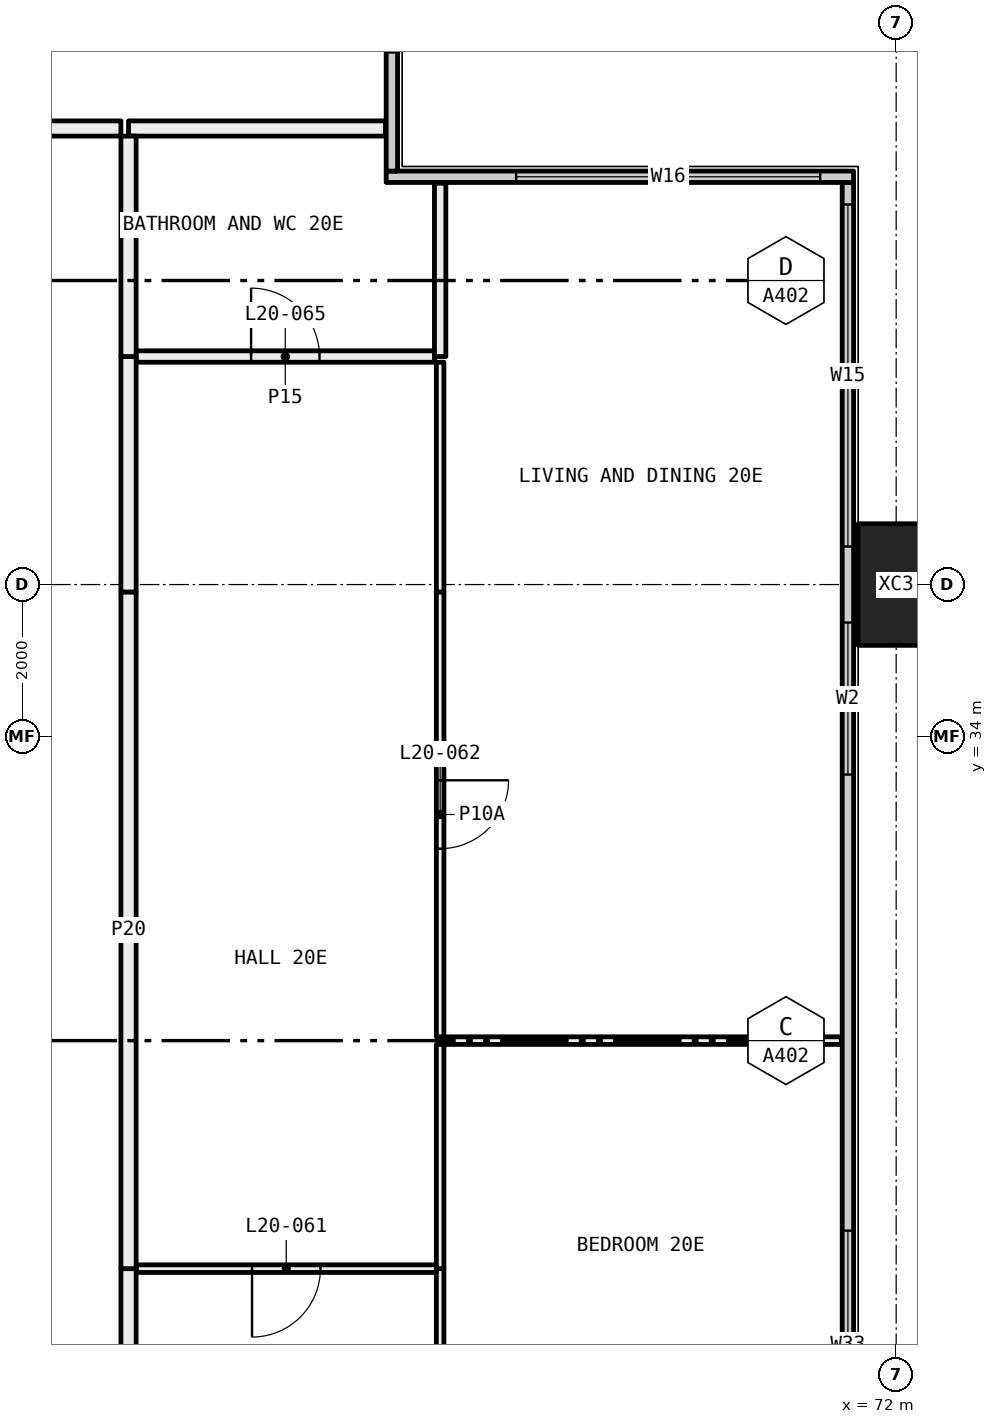
"""IFC4 building model, lengths in metres.
Left out: names, types, materials, properties, quantities, classifications, styles, units other than length and angle.
Written with IfcOpenShell. Run it as: python <this file> out.ifc"""

import sys

from ifc_helpers import new_model, si_unit, direction, frame, frame_2d, origin, origin_2d, place, context, subcontext, project, spatial, rectangle, hollow_rectangle, extrude, element, fill, save


model = new_model("IFC4")
c1 = context("Model", 3, precision=1e-05, world=origin(), true_north=direction((0.0, 1.0)))
c2 = subcontext(c1, "Body", "Model", "MODEL_VIEW")
j1 = project(units=[si_unit("LENGTHUNIT", "METRE"), si_unit("PLANEANGLEUNIT", "RADIAN")], contexts=[c1])
p1 = place(None, origin())
s1 = spatial("IfcSite", under=j1, at=p1, CompositionType="ELEMENT")
p2 = place(p1, origin())
s2 = spatial("IfcBuilding", under=s1, at=p2, CompositionType="ELEMENT")
p3 = place(p2, frame((0.0, 0.0, 81.75)))
s3 = spatial("IfcBuildingStorey", under=s2, at=p3, CompositionType="ELEMENT", Elevation=81.75)
p4 = place(p3, frame((72.0, 36.0, -0.4), z_axis=(0.0, 0.0, 1.0), x_axis=(0.0, 1.0, 0.0)))
e1 = element("IfcColumn", 1, at=p4, inside=s3, PredefinedType="COLUMN", context=c2, shape_type="SweptSolid", body=[
    extrude(hollow_rectangle(XDim=1.6, YDim=1.0, WallThickness=0.065, at=origin_2d()), origin(), (0.0, 0.0, 1.0), 3.45),
])
p5 = place(p3, frame((71.365, 6.71, 0.0), z_axis=(0.0, 0.0, 1.0), x_axis=(0.0, 1.0, 0.0)))
e2 = element("IfcWall", 2, at=p5, inside=s3, PredefinedType="ELEMENTEDWALL", context=c2, shape_type="SweptSolid", body=[
    extrude(rectangle(XDim=34.58, YDim=0.15, at=frame_2d((17.29, 0.0))), origin(), (0.0, 0.0, 1.0), 3.05),
])
p6 = place(p5, frame((0.29, 0.0, 0.45)))
e3 = element("IfcOpeningElement", 3, at=p6, cuts=e2, PredefinedType="OPENING", context=c2, shape_type="SweptSolid", body=[
    extrude(rectangle(XDim=4.5, YDim=2.55, at=frame_2d((2.25, 1.275))), frame((0.0, 0.085, 0.0), z_axis=(0.0, -1.0, 0.0), x_axis=(1.0, 0.0, 0.0)), (0.0, 0.0, 1.0), 0.17),
])
p7 = place(p5, frame((5.79, 0.0, 0.45)))
e4 = element("IfcOpeningElement", 4, at=p7, cuts=e2, PredefinedType="OPENING", context=c2, shape_type="SweptSolid", body=[
    extrude(rectangle(XDim=3.0, YDim=2.55, at=frame_2d((1.5, 1.275))), frame((0.0, 0.085, 0.0), z_axis=(0.0, -1.0, 0.0), x_axis=(1.0, 0.0, 0.0)), (0.0, 0.0, 1.0), 0.17),
])
p8 = place(p5, frame((13.79, 0.0, 0.45)))
e5 = element("IfcOpeningElement", 5, at=p8, cuts=e2, PredefinedType="OPENING", context=c2, shape_type="SweptSolid", body=[
    extrude(rectangle(XDim=3.0, YDim=2.55, at=frame_2d((1.5, 1.275))), frame((0.0, 0.085, 0.0), z_axis=(0.0, -1.0, 0.0), x_axis=(1.0, 0.0, 0.0)), (0.0, 0.0, 1.0), 0.17),
])
p9 = place(p5, frame((17.79, 0.0, 0.45)))
e6 = element("IfcOpeningElement", 6, at=p9, cuts=e2, PredefinedType="OPENING", context=c2, shape_type="SweptSolid", body=[
    extrude(rectangle(XDim=3.0, YDim=2.55, at=frame_2d((1.5, 1.275))), frame((0.0, 0.085, 0.0), z_axis=(0.0, -1.0, 0.0), x_axis=(1.0, 0.0, 0.0)), (0.0, 0.0, 1.0), 0.17),
])
p10 = place(p5, frame((26.79, 0.0, 0.45)))
e7 = element("IfcOpeningElement", 7, at=p10, cuts=e2, PredefinedType="OPENING", context=c2, shape_type="SweptSolid", body=[
    extrude(rectangle(XDim=2.0, YDim=2.55, at=frame_2d((1.0, 1.275))), frame((0.0, 0.085, 0.0), z_axis=(0.0, -1.0, 0.0), x_axis=(1.0, 0.0, 0.0)), (0.0, 0.0, 1.0), 0.17),
])
p11 = place(p5, frame((29.79, 0.0, 0.45)))
e8 = element("IfcOpeningElement", 8, at=p11, cuts=e2, PredefinedType="OPENING", context=c2, shape_type="SweptSolid", body=[
    extrude(rectangle(XDim=4.5, YDim=2.55, at=frame_2d((2.25, 1.275))), frame((0.0, 0.085, 0.0), z_axis=(0.0, -1.0, 0.0), x_axis=(1.0, 0.0, 0.0)), (0.0, 0.0, 1.0), 0.17),
])
p12 = place(p3, frame((65.29, 41.365, 0.0), z_axis=(0.0, 0.0, 1.0), x_axis=(1.0, 0.0, 0.0)))
e9 = element("IfcWall", 9, at=p12, inside=s3, PredefinedType="ELEMENTEDWALL", context=c2, shape_type="SweptSolid", body=[
    extrude(rectangle(XDim=6.15, YDim=0.15, at=frame_2d((3.075, 0.0))), origin(), (0.0, 0.0, 1.0), 3.05),
])
p13 = place(p12, frame((1.71, 0.0, 0.45)))
e10 = element("IfcOpeningElement", 10, at=p13, cuts=e9, PredefinedType="OPENING", context=c2, shape_type="SweptSolid", body=[
    extrude(rectangle(XDim=4.0, YDim=2.55, at=frame_2d((2.0, 1.275))), frame((0.0, 0.085, 0.0), z_axis=(0.0, -1.0, 0.0), x_axis=(1.0, 0.0, 0.0)), (0.0, 0.0, 1.0), 0.17),
])
p14 = place(p3, frame((65.365, 41.44, 0.0), z_axis=(0.0, 0.0, 1.0), x_axis=(0.0, 1.0, 0.0)))
e11 = element("IfcWall", 11, at=p14, inside=s3, PredefinedType="ELEMENTEDWALL", context=c2, shape_type="SweptSolid", body=[
    extrude(rectangle(XDim=5.85, YDim=0.15, at=frame_2d((2.925, 0.0))), origin(), (0.0, 0.0, 1.0), 3.05),
])
p15 = place(p14, frame((1.56, 0.0, 0.45)))
e12 = element("IfcOpeningElement", 12, at=p15, cuts=e11, PredefinedType="OPENING", context=c2, shape_type="SweptSolid", body=[
    extrude(rectangle(XDim=4.0, YDim=2.55, at=frame_2d((2.0, 1.275))), frame((0.0, 0.085, 0.0), z_axis=(0.0, -1.0, 0.0), x_axis=(1.0, 0.0, 0.0)), (0.0, 0.0, 1.0), 0.17),
])
p16 = place(p3, frame((71.28, 30.0, 0.0), z_axis=(0.0, 0.0, 1.0), x_axis=(-1.0, 0.0, 0.0)))
e13 = element("IfcWall", 13, at=p16, inside=s3, PredefinedType="PARTITIONING", context=c2, shape_type="SweptSolid", body=[
    extrude(rectangle(XDim=5.28, YDim=0.1, at=frame_2d((2.64, 0.0))), origin(), (0.0, 0.0, 1.0), 3.05),
])
p17 = place(p3, frame((66.0, 27.0, 0.0), z_axis=(0.0, 0.0, 1.0), x_axis=(0.0, -1.0, 0.0)))
e14 = element("IfcWall", 14, at=p17, inside=s3, PredefinedType="PARTITIONING", context=c2, shape_type="SweptSolid", body=[
    extrude(rectangle(XDim=2.95, YDim=0.1, at=frame_2d((1.475, 0.0))), origin(), (0.0, 0.0, 1.0), 2.45),
])
p18 = place(p3, frame((66.0, 29.95, 0.0), z_axis=(0.0, 0.0, 1.0), x_axis=(0.0, -1.0, 0.0)))
e15 = element("IfcWall", 15, at=p18, inside=s3, PredefinedType="PARTITIONING", context=c2, shape_type="SweptSolid", body=[
    extrude(rectangle(XDim=2.95, YDim=0.1, at=frame_2d((1.475, 0.0))), origin(), (0.0, 0.0, 1.0), 3.05),
])
p19 = place(p3, frame((66.0, 38.925, 0.0), z_axis=(0.0, 0.0, 1.0), x_axis=(0.0, -1.0, 0.0)))
e16 = element("IfcWall", 16, at=p19, inside=s3, PredefinedType="PARTITIONING", context=c2, shape_type="SweptSolid", body=[
    extrude(rectangle(XDim=3.025, YDim=0.1, at=frame_2d((1.513, 0.0))), origin(), (0.0, 0.0, 1.0), 2.45),
])
p20 = place(p3, frame((66.0, 35.9, 0.0), z_axis=(0.0, 0.0, 1.0), x_axis=(0.0, -1.0, 0.0)))
e17 = element("IfcWall", 17, at=p20, inside=s3, PredefinedType="PARTITIONING", context=c2, shape_type="SweptSolid", body=[
    extrude(rectangle(XDim=5.85, YDim=0.1, at=frame_2d((2.925, 0.0))), origin(), (0.0, 0.0, 1.0), 3.05),
])
p21 = place(p20, frame((2.475, 0.0, 0.0)))
e18 = element("IfcOpeningElement", 18, at=p21, cuts=e17, PredefinedType="OPENING", context=c2, shape_type="SweptSolid", body=[
    extrude(rectangle(XDim=0.9, YDim=2.1, at=frame_2d((0.45, 1.05))), frame((0.0, 0.06, 0.0), z_axis=(0.0, -1.0, 0.0), x_axis=(1.0, 0.0, 0.0)), (0.0, 0.0, 1.0), 0.12),
])
p22 = place(p3, frame((66.0, 41.28, 0.0), z_axis=(0.0, 0.0, 1.0), x_axis=(0.0, -1.0, 0.0)))
e19 = element("IfcWall", 19, at=p22, inside=s3, PredefinedType="PARTITIONING", context=c2, shape_type="SweptSolid", body=[
    extrude(rectangle(XDim=2.28, YDim=0.15, at=frame_2d((1.14, 0.0))), origin(), (0.0, 0.0, 1.0), 3.05),
])
p23 = place(p3, frame((65.95, 27.0, 0.0), z_axis=(0.0, 0.0, 1.0), x_axis=(-1.0, 0.0, 0.0)))
e20 = element("IfcWall", 20, at=p23, inside=s3, PredefinedType="PARTITIONING", context=c2, shape_type="SweptSolid", body=[
    extrude(rectangle(XDim=3.95, YDim=0.1, at=frame_2d((1.975, 0.0))), origin(), (0.0, 0.0, 1.0), 3.05),
])
p24 = place(p23, frame((1.525, 0.0, 0.0)))
e21 = element("IfcOpeningElement", 21, at=p24, cuts=e20, PredefinedType="OPENING", context=c2, shape_type="SweptSolid", body=[
    extrude(rectangle(XDim=0.9, YDim=2.1, at=frame_2d((0.45, 1.05))), frame((0.0, 0.06, 0.0), z_axis=(0.0, -1.0, 0.0), x_axis=(1.0, 0.0, 0.0)), (0.0, 0.0, 1.0), 0.12),
])
p25 = place(p3, frame((61.9, 27.0, 0.0), z_axis=(0.0, 0.0, 1.0), x_axis=(0.0, -1.0, 0.0)))
e22 = element("IfcWall", 22, at=p25, inside=s3, PredefinedType="PARTITIONING", context=c2, shape_type="SweptSolid", body=[
    extrude(rectangle(XDim=3.1, YDim=0.2, at=frame_2d((1.55, 0.0))), origin(), (0.0, 0.0, 1.0), 2.45),
])
p26 = place(p25, frame((1.05, 0.0, 0.0)))
e23 = element("IfcOpeningElement", 23, at=p26, cuts=e22, PredefinedType="OPENING", context=c2, shape_type="SweptSolid", body=[
    extrude(rectangle(XDim=1.0, YDim=2.1, at=frame_2d((0.5, 1.05))), frame((0.0, 0.11, 0.0), z_axis=(0.0, -1.0, 0.0), x_axis=(1.0, 0.0, 0.0)), (0.0, 0.0, 1.0), 0.22),
])
p27 = place(p3, frame((65.925, 39.0, 0.0), z_axis=(0.0, 0.0, 1.0), x_axis=(-1.0, 0.0, 0.0)))
e24 = element("IfcWall", 24, at=p27, inside=s3, PredefinedType="PARTITIONING", context=c2, shape_type="SweptSolid", body=[
    extrude(rectangle(XDim=3.925, YDim=0.15, at=frame_2d((1.962, 0.0))), origin(), (0.0, 0.0, 1.0), 3.05),
])
p28 = place(p27, frame((1.512, 0.0, 0.0)))
e25 = element("IfcOpeningElement", 25, at=p28, cuts=e24, PredefinedType="OPENING", context=c2, shape_type="SweptSolid", body=[
    extrude(rectangle(XDim=0.9, YDim=2.1, at=frame_2d((0.45, 1.05))), frame((0.0, 0.085, 0.0), z_axis=(0.0, -1.0, 0.0), x_axis=(1.0, 0.0, 0.0)), (0.0, 0.0, 1.0), 0.17),
])
p29 = place(p3, frame((61.9, 39.0, 0.0), z_axis=(0.0, 0.0, 1.0), x_axis=(0.0, -1.0, 0.0)))
e26 = element("IfcWall", 26, at=p29, inside=s3, PredefinedType="PARTITIONING", context=c2, shape_type="SweptSolid", body=[
    extrude(rectangle(XDim=3.1, YDim=0.2, at=frame_2d((1.55, 0.0))), origin(), (0.0, 0.0, 1.0), 2.45),
])
p30 = place(p3, frame((61.9, 35.9, 0.0), z_axis=(0.0, 0.0, 1.0), x_axis=(0.0, -1.0, 0.0)))
e27 = element("IfcWall", 27, at=p30, inside=s3, PredefinedType="PARTITIONING", context=c2, shape_type="SweptSolid", body=[
    extrude(rectangle(XDim=8.9, YDim=0.2, at=frame_2d((4.45, 0.0))), origin(), (0.0, 0.0, 1.0), 3.05),
])
p31 = place(p3, frame((65.28, 42.0, 0.0), z_axis=(0.0, 0.0, 1.0), x_axis=(-1.0, 0.0, 0.0)))
e28 = element("IfcWall", 28, at=p31, inside=s3, PredefinedType="PARTITIONING", context=c2, shape_type="SweptSolid", body=[
    extrude(rectangle(XDim=3.38, YDim=0.2, at=frame_2d((1.69, 0.0))), origin(), (0.0, 0.0, 1.0), 3.05),
])
p32 = place(p3, frame((61.9, 41.9, 0.0), z_axis=(0.0, 0.0, 1.0), x_axis=(0.0, -1.0, 0.0)))
e29 = element("IfcWall", 29, at=p32, inside=s3, PredefinedType="PARTITIONING", context=c2, shape_type="SweptSolid", body=[
    extrude(rectangle(XDim=2.9, YDim=0.2, at=frame_2d((1.45, 0.0))), origin(), (0.0, 0.0, 1.0), 3.05),
])
p33 = place(p3, frame((60.0, 42.0, 0.0), z_axis=(0.0, 0.0, 1.0), x_axis=(1.0, 0.0, 0.0)))
e30 = element("IfcWall", 30, at=p33, inside=s3, PredefinedType="PARTITIONING", context=c2, shape_type="SweptSolid", body=[
    extrude(rectangle(XDim=1.8, YDim=0.2, at=frame_2d((0.9, 0.0))), origin(), (0.0, 0.0, 1.0), 3.05),
])
p34 = place(p9, origin())
e31 = element("IfcWindow", 31, at=p34, inside=s3, PartitioningType="SINGLE_PANEL", PredefinedType="WINDOW", context=c2, shape_type="SweptSolid", body=[
    extrude(rectangle(XDim=3.0, YDim=2.55, at=frame_2d((1.5, 1.275))), frame((0.0, 0.03, 0.0), z_axis=(0.0, -1.0, 0.0), x_axis=(1.0, 0.0, 0.0)), (0.0, 0.0, 1.0), 0.06),
])
fill(e6, e31)
p35 = place(p10, origin())
e32 = element("IfcWindow", 32, at=p35, inside=s3, PartitioningType="SINGLE_PANEL", PredefinedType="WINDOW", context=c2, shape_type="SweptSolid", body=[
    extrude(rectangle(XDim=2.0, YDim=2.55, at=frame_2d((1.0, 1.275))), frame((0.0, 0.03, 0.0), z_axis=(0.0, -1.0, 0.0), x_axis=(1.0, 0.0, 0.0)), (0.0, 0.0, 1.0), 0.06),
])
fill(e7, e32)
p36 = place(p11, origin())
e33 = element("IfcWindow", 33, at=p36, inside=s3, PartitioningType="SINGLE_PANEL", PredefinedType="WINDOW", context=c2, shape_type="SweptSolid", body=[
    extrude(rectangle(XDim=4.5, YDim=2.55, at=frame_2d((2.25, 1.275))), frame((0.0, 0.03, 0.0), z_axis=(0.0, -1.0, 0.0), x_axis=(1.0, 0.0, 0.0)), (0.0, 0.0, 1.0), 0.06),
])
fill(e8, e33)
p37 = place(p13, origin())
e34 = element("IfcWindow", 34, at=p37, inside=s3, PartitioningType="SINGLE_PANEL", PredefinedType="WINDOW", context=c2, shape_type="SweptSolid", body=[
    extrude(rectangle(XDim=4.0, YDim=2.55, at=frame_2d((2.0, 1.275))), frame((0.0, 0.03, 0.0), z_axis=(0.0, -1.0, 0.0), x_axis=(1.0, 0.0, 0.0)), (0.0, 0.0, 1.0), 0.06),
])
fill(e10, e34)
p38 = place(p24, origin())
e35 = element("IfcDoor", 35, at=p38, inside=s3, OperationType="SINGLE_SWING_LEFT", PredefinedType="DOOR", context=c2, shape_type="SweptSolid", body=[
    extrude(rectangle(XDim=0.9, YDim=2.1, at=frame_2d((0.45, 1.05))), frame((0.0, 0.025, 0.0), z_axis=(0.0, -1.0, 0.0), x_axis=(1.0, 0.0, 0.0)), (0.0, 0.0, 1.0), 0.05),
])
fill(e21, e35)
p39 = place(p21, origin())
e36 = element("IfcDoor", 36, at=p39, inside=s3, OperationType="SINGLE_SWING_RIGHT", PredefinedType="DOOR", context=c2, shape_type="SweptSolid", body=[
    extrude(rectangle(XDim=0.9, YDim=2.1, at=frame_2d((0.45, 1.05))), frame((0.0, 0.025, 0.0), z_axis=(0.0, -1.0, 0.0), x_axis=(1.0, 0.0, 0.0)), (0.0, 0.0, 1.0), 0.05),
])
fill(e18, e36)
p40 = place(p28, frame((0.9, 0.0, 0.0), x_axis=(-1.0, 0.0, 0.0)))
e37 = element("IfcDoor", 37, at=p40, inside=s3, OperationType="SINGLE_SWING_RIGHT", PredefinedType="DOOR", context=c2, shape_type="SweptSolid", body=[
    extrude(rectangle(XDim=0.9, YDim=2.1, at=frame_2d((0.45, 1.05))), frame((0.0, 0.025, 0.0), z_axis=(0.0, -1.0, 0.0), x_axis=(1.0, 0.0, 0.0)), (0.0, 0.0, 1.0), 0.05),
])
fill(e25, e37)
save(model, sys.argv[1])
